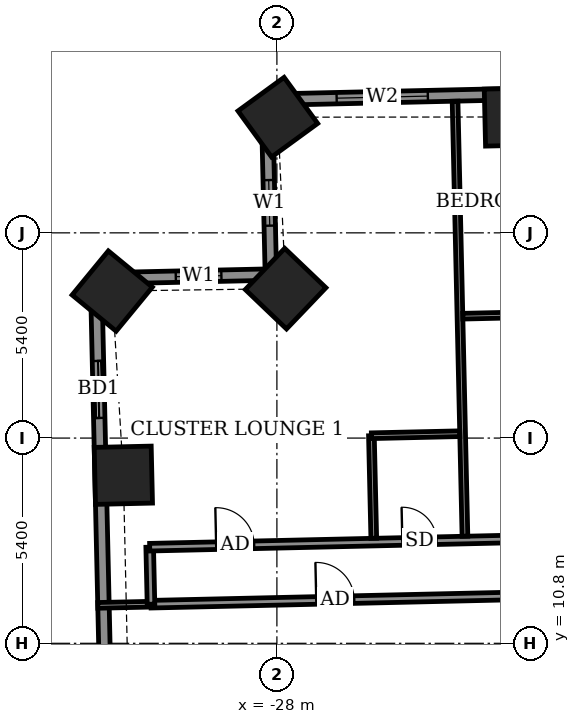
"""IFC4 building model, lengths in metres.
Left out: names, types, materials, properties, quantities, classifications, styles, units other than length and angle.
Written with IfcOpenShell. Run it as: python <this file> out.ifc"""

import sys

from ifc_helpers import new_model, si_unit, direction, frame, frame_2d, origin, origin_2d, place, context, subcontext, project, spatial, rectangle, extrude, element, fill, save


model = new_model("IFC4")
c1 = context("Model", 3, precision=1e-05, world=origin(), true_north=direction((0.0, 1.0)))
c2 = subcontext(c1, "Body", "Model", "MODEL_VIEW")
j1 = project(units=[si_unit("LENGTHUNIT", "METRE"), si_unit("PLANEANGLEUNIT", "RADIAN")], contexts=[c1])
p1 = place(None, origin())
s1 = spatial("IfcSite", under=j1, at=p1, CompositionType="ELEMENT")
p2 = place(p1, origin())
s2 = spatial("IfcBuilding", under=s1, at=p2, CompositionType="ELEMENT")
p3 = place(p2, frame((0.0, 0.0, 48.5)))
s3 = spatial("IfcBuildingStorey", under=s2, at=p3, CompositionType="ELEMENT", Elevation=48.5)
for number, where, z_axis, x_axis in (
    (1, (-21.777, 24.649, -0.55), (0.0, 0.0, 1.0), (-1.0, -0.023, 0.0)),
    (2, (-27.975, 24.643, -0.55), (0.0, 0.0, 1.0), (-0.808, -0.589, 0.0)),
    (3, (-27.771, 20.132, -0.55), (0.0, 0.0, 1.0), (-0.691, -0.723, 0.0)),
    (4, (-32.333, 20.069, -0.55), (0.0, 0.0, 1.0), (-0.635, -0.772, 0.0)),
    (5, (-32.04, 15.222, -0.55), (0.0, 0.0, 1.0), (0.023, -1.0, 0.0)),
):
    element("IfcColumn", number, at=place(p3, frame(where, z_axis=z_axis, x_axis=x_axis)), inside=s3, PredefinedType="COLUMN", context=c2, shape_type="SweptSolid", body=[
        extrude(rectangle(XDim=1.5, YDim=1.5, at=origin_2d()), origin(), (0.0, 0.0, 1.0), 3.6),
    ])
p4 = place(p3, frame((24.423, 26.298, 0.0), z_axis=(0.0, 0.0, 1.0), x_axis=(-0.999742433108, -0.022695097355, 0.0)))
e6 = element("IfcWall", 6, at=p4, inside=s3, PredefinedType="SOLIDWALL", context=c2, shape_type="SweptSolid", body=[
    extrude(rectangle(XDim=52.701, YDim=0.3, at=frame_2d((26.35, 0.0))), origin(), (0.0, 0.0, 1.0), 3.05),
])
p5 = place(p4, frame((2.009, 0.0, 0.0)))
e7 = element("IfcOpeningElement", 7, at=p5, cuts=e6, PredefinedType="OPENING", context=c2, shape_type="SweptSolid", body=[
    extrude(rectangle(XDim=1.5, YDim=2.4, at=frame_2d((0.75, 1.2))), frame((0.0, 0.16, 0.0), z_axis=(0.0, -1.0, 0.0), x_axis=(1.0, 0.0, 0.0)), (0.0, 0.0, 1.0), 0.32),
])
p6 = place(p4, frame((7.337, 0.0, 0.0)))
e8 = element("IfcOpeningElement", 8, at=p6, cuts=e6, PredefinedType="OPENING", context=c2, shape_type="SweptSolid", body=[
    extrude(rectangle(XDim=1.2, YDim=2.4, at=frame_2d((0.6, 1.2))), frame((0.0, 0.16, 0.0), z_axis=(0.0, -1.0, 0.0), x_axis=(1.0, 0.0, 0.0)), (0.0, 0.0, 1.0), 0.32),
])
p7 = place(p4, frame((10.0, 0.0, 0.0)))
e9 = element("IfcOpeningElement", 9, at=p7, cuts=e6, PredefinedType="OPENING", context=c2, shape_type="SweptSolid", body=[
    extrude(rectangle(XDim=1.5, YDim=2.4, at=frame_2d((0.75, 1.2))), frame((0.0, 0.16, 0.0), z_axis=(0.0, -1.0, 0.0), x_axis=(1.0, 0.0, 0.0)), (0.0, 0.0, 1.0), 0.32),
])
p8 = place(p4, frame((14.85, 0.0, 0.0)))
e10 = element("IfcOpeningElement", 10, at=p8, cuts=e6, PredefinedType="OPENING", context=c2, shape_type="SweptSolid", body=[
    extrude(rectangle(XDim=1.5, YDim=2.4, at=frame_2d((0.75, 1.2))), frame((0.0, 0.16, 0.0), z_axis=(0.0, -1.0, 0.0), x_axis=(1.0, 0.0, 0.0)), (0.0, 0.0, 1.0), 0.32),
])
p9 = place(p4, frame((20.638, 0.0, 0.9)))
e11 = element("IfcOpeningElement", 11, at=p9, cuts=e6, PredefinedType="OPENING", context=c2, shape_type="SweptSolid", body=[
    extrude(rectangle(XDim=0.9, YDim=1.5, at=frame_2d((0.45, 0.75))), frame((0.0, 0.16, 0.0), z_axis=(0.0, -1.0, 0.0), x_axis=(1.0, 0.0, 0.0)), (0.0, 0.0, 1.0), 0.32),
])
p10 = place(p4, frame((23.125, 0.0, 0.0)))
e12 = element("IfcOpeningElement", 12, at=p10, cuts=e6, PredefinedType="OPENING", context=c2, shape_type="SweptSolid", body=[
    extrude(rectangle(XDim=1.5, YDim=2.4, at=frame_2d((0.75, 1.2))), frame((0.0, 0.16, 0.0), z_axis=(0.0, -1.0, 0.0), x_axis=(1.0, 0.0, 0.0)), (0.0, 0.0, 1.0), 0.32),
])
p11 = place(p4, frame((27.9, 0.0, 0.0)))
e13 = element("IfcOpeningElement", 13, at=p11, cuts=e6, PredefinedType="OPENING", context=c2, shape_type="SweptSolid", body=[
    extrude(rectangle(XDim=1.5, YDim=2.4, at=frame_2d((0.75, 1.2))), frame((0.0, 0.16, 0.0), z_axis=(0.0, -1.0, 0.0), x_axis=(1.0, 0.0, 0.0)), (0.0, 0.0, 1.0), 0.32),
])
p12 = place(p4, frame((30.862, 0.0, 0.0)))
e14 = element("IfcOpeningElement", 14, at=p12, cuts=e6, PredefinedType="OPENING", context=c2, shape_type="SweptSolid", body=[
    extrude(rectangle(XDim=1.2, YDim=2.4, at=frame_2d((0.6, 1.2))), frame((0.0, 0.16, 0.0), z_axis=(0.0, -1.0, 0.0), x_axis=(1.0, 0.0, 0.0)), (0.0, 0.0, 1.0), 0.32),
])
p13 = place(p4, frame((36.1, 0.0, 0.0)))
e15 = element("IfcOpeningElement", 15, at=p13, cuts=e6, PredefinedType="OPENING", context=c2, shape_type="SweptSolid", body=[
    extrude(rectangle(XDim=1.5, YDim=2.4, at=frame_2d((0.75, 1.2))), frame((0.0, 0.16, 0.0), z_axis=(0.0, -1.0, 0.0), x_axis=(1.0, 0.0, 0.0)), (0.0, 0.0, 1.0), 0.32),
])
p14 = place(p4, frame((40.975, 0.0, 0.0)))
e16 = element("IfcOpeningElement", 16, at=p14, cuts=e6, PredefinedType="OPENING", context=c2, shape_type="SweptSolid", body=[
    extrude(rectangle(XDim=1.5, YDim=2.4, at=frame_2d((0.75, 1.2))), frame((0.0, 0.16, 0.0), z_axis=(0.0, -1.0, 0.0), x_axis=(1.0, 0.0, 0.0)), (0.0, 0.0, 1.0), 0.32),
])
p15 = place(p4, frame((43.788, 0.0, 0.0)))
e17 = element("IfcOpeningElement", 17, at=p15, cuts=e6, PredefinedType="OPENING", context=c2, shape_type="SweptSolid", body=[
    extrude(rectangle(XDim=1.5, YDim=2.4, at=frame_2d((0.75, 1.2))), frame((0.0, 0.16, 0.0), z_axis=(0.0, -1.0, 0.0), x_axis=(1.0, 0.0, 0.0)), (0.0, 0.0, 1.0), 0.32),
])
p16 = place(p4, frame((48.464, 0.0, 0.9)))
e18 = element("IfcOpeningElement", 18, at=p16, cuts=e6, PredefinedType="OPENING", context=c2, shape_type="SweptSolid", body=[
    extrude(rectangle(XDim=2.4, YDim=1.5, at=frame_2d((1.2, 0.75))), frame((0.0, 0.16, 0.0), z_axis=(0.0, -1.0, 0.0), x_axis=(1.0, 0.0, 0.0)), (0.0, 0.0, 1.0), 0.32),
])
p17 = place(p3, frame((-28.264, 25.102, 0.0), z_axis=(0.0, 0.0, 1.0), x_axis=(0.022820258049, -0.999739584003, 0.0)))
e19 = element("IfcWall", 19, at=p17, inside=s3, PredefinedType="SOLIDWALL", context=c2, shape_type="SweptSolid", body=[
    extrude(rectangle(XDim=4.6, YDim=0.3, at=frame_2d((2.3, 0.0))), origin(), (0.0, 0.0, 1.0), 2.55),
])
p18 = place(p17, frame((2.114, 0.0, 0.9)))
e20 = element("IfcOpeningElement", 20, at=p18, cuts=e19, PredefinedType="OPENING", context=c2, shape_type="SweptSolid", body=[
    extrude(rectangle(XDim=1.2, YDim=1.5, at=frame_2d((0.6, 0.75))), frame((0.0, 0.16, 0.0), z_axis=(0.0, -1.0, 0.0), x_axis=(1.0, 0.0, 0.0)), (0.0, 0.0, 1.0), 0.32),
])
p19 = place(p3, frame((-28.159, 20.503, 0.0), z_axis=(0.0, 0.0, 1.0), x_axis=(-0.999744404568, -0.02260808559, 0.0)))
e21 = element("IfcWall", 21, at=p19, inside=s3, PredefinedType="SOLIDWALL", context=c2, shape_type="SweptSolid", body=[
    extrude(rectangle(XDim=4.6, YDim=0.3, at=frame_2d((2.3, 0.0))), origin(), (0.0, 0.0, 1.0), 3.05),
])
p20 = place(p19, frame((1.302, 0.0, 0.9)))
e22 = element("IfcOpeningElement", 22, at=p20, cuts=e21, PredefinedType="OPENING", context=c2, shape_type="SweptSolid", body=[
    extrude(rectangle(XDim=1.2, YDim=1.5, at=frame_2d((0.6, 0.75))), frame((0.0, 0.16, 0.0), z_axis=(0.0, -1.0, 0.0), x_axis=(1.0, 0.0, 0.0)), (0.0, 0.0, 1.0), 0.32),
])
p21 = place(p3, frame((-32.758, 20.399, 0.0), z_axis=(0.0, 0.0, 1.0), x_axis=(0.022668485183, -0.999743036875, 0.0)))
e23 = element("IfcWall", 23, at=p21, inside=s3, PredefinedType="SOLIDWALL", context=c2, shape_type="SweptSolid", body=[
    extrude(rectangle(XDim=15.929, YDim=0.3, at=frame_2d((7.964, 0.0))), origin(), (0.0, 0.0, 1.0), 3.05),
])
p22 = place(p21, frame((2.17, 0.0, 0.0)))
e24 = element("IfcOpeningElement", 24, at=p22, cuts=e23, PredefinedType="OPENING", context=c2, shape_type="SweptSolid", body=[
    extrude(rectangle(XDim=1.5, YDim=2.4, at=frame_2d((0.75, 1.2))), frame((0.0, 0.16, 0.0), z_axis=(0.0, -1.0, 0.0), x_axis=(1.0, 0.0, 0.0)), (0.0, 0.0, 1.0), 0.32),
])
p23 = place(p21, frame((12.275, 0.0, 0.9)))
e25 = element("IfcOpeningElement", 25, at=p23, cuts=e23, PredefinedType="OPENING", context=c2, shape_type="SweptSolid", body=[
    extrude(rectangle(XDim=2.4, YDim=1.5, at=frame_2d((1.2, 0.75))), frame((0.0, 0.16, 0.0), z_axis=(0.0, -1.0, 0.0), x_axis=(1.0, 0.0, 0.0)), (0.0, 0.0, 1.0), 0.32),
])
p24 = place(p3, frame((-28.446, 26.548, 0.0), z_axis=(0.0, 0.0, 1.0), x_axis=(0.999743608889, 0.022643243723, 0.0)))
e26 = element("IfcWall", 26, at=p24, inside=s3, PredefinedType="USERDEFINED", context=c2, shape_type="SweptSolid", body=[
    extrude(rectangle(XDim=2.199, YDim=0.55, at=frame_2d((1.1, 0.0))), origin(), (0.0, 0.0, 1.0), 0.8),
])
p25 = place(p3, frame((-34.032, 12.618, 0.0), z_axis=(0.0, 0.0, 1.0), x_axis=(-0.022662255828, 0.999743178102, 0.0)))
e27 = element("IfcWall", 27, at=p25, inside=s3, PredefinedType="USERDEFINED", context=c2, shape_type="SweptSolid", body=[
    extrude(rectangle(XDim=6.0, YDim=0.55, at=frame_2d((3.0, 0.0))), origin(), (0.0, 0.0, 1.0), 0.8),
])
p26 = place(p3, frame((-32.713, 11.798, 0.0), z_axis=(0.0, 0.0, 1.0), x_axis=(0.999756172383, 0.022081571112, 0.0)))
e28 = element("IfcWall", 28, at=p26, inside=s3, PredefinedType="PARTITIONING", context=c2, shape_type="SweptSolid", body=[
    extrude(rectangle(XDim=1.404, YDim=0.15, at=frame_2d((0.702, 0.0))), origin(), (0.0, 0.0, 1.0), 2.55),
])
p27 = place(p3, frame((-31.313, 11.829, 0.0), z_axis=(0.0, 0.0, 1.0), x_axis=(0.999742346277, 0.022698921993, 0.0)))
e29 = element("IfcWall", 29, at=p27, inside=s3, PredefinedType="PARTITIONING", context=c2, shape_type="SweptSolid", body=[
    extrude(rectangle(XDim=11.1, YDim=0.2, at=frame_2d((5.55, 0.0))), origin(), (0.0, 0.0, 1.0), 3.05),
])
p28 = place(p27, frame((4.35, 0.0, 0.0)))
e30 = element("IfcOpeningElement", 30, at=p28, cuts=e29, PredefinedType="OPENING", context=c2, shape_type="SweptSolid", body=[
    extrude(rectangle(XDim=1.0, YDim=2.1, at=frame_2d((0.5, 1.05))), frame((0.0, 0.11, 0.0), z_axis=(0.0, -1.0, 0.0), x_axis=(1.0, 0.0, 0.0)), (0.0, 0.0, 1.0), 0.22),
])
p29 = place(p3, frame((-31.313, 11.829, 0.0), z_axis=(0.0, 0.0, 1.0), x_axis=(-0.022617910375, 0.999744182344, 0.0)))
e31 = element("IfcWall", 31, at=p29, inside=s3, PredefinedType="PARTITIONING", context=c2, shape_type="SweptSolid", body=[
    extrude(rectangle(XDim=1.5, YDim=0.2, at=frame_2d((0.75, 0.0))), origin(), (0.0, 0.0, 1.0), 3.05),
])
p30 = place(p3, frame((-31.347, 13.329, 0.0), z_axis=(0.0, 0.0, 1.0), x_axis=(0.999742613079, 0.022687168058, 0.0)))
e32 = element("IfcWall", 32, at=p30, inside=s3, PredefinedType="PARTITIONING", context=c2, shape_type="SweptSolid", body=[
    extrude(rectangle(XDim=58.799, YDim=0.2, at=frame_2d((29.399, 0.0))), origin(), (0.0, 0.0, 1.0), 3.05),
])
p31 = place(p30, frame((56.675, 0.0, 0.0)))
e33 = element("IfcOpeningElement", 33, at=p31, cuts=e32, PredefinedType="OPENING", context=c2, shape_type="SweptSolid", body=[
    extrude(rectangle(XDim=1.0, YDim=2.1, at=frame_2d((0.5, 1.05))), frame((0.0, 0.11, 0.0), z_axis=(0.0, -1.0, 0.0), x_axis=(1.0, 0.0, 0.0)), (0.0, 0.0, 1.0), 0.22),
])
p32 = place(p30, frame((52.4, 0.0, 0.0)))
e34 = element("IfcOpeningElement", 34, at=p32, cuts=e32, PredefinedType="OPENING", context=c2, shape_type="SweptSolid", body=[
    extrude(rectangle(XDim=0.9, YDim=2.1, at=frame_2d((0.45, 1.05))), frame((0.0, 0.11, 0.0), z_axis=(0.0, -1.0, 0.0), x_axis=(1.0, 0.0, 0.0)), (0.0, 0.0, 1.0), 0.22),
])
p33 = place(p30, frame((47.7, 0.0, 0.0)))
e35 = element("IfcOpeningElement", 35, at=p33, cuts=e32, PredefinedType="OPENING", context=c2, shape_type="SweptSolid", body=[
    extrude(rectangle(XDim=0.9, YDim=2.1, at=frame_2d((0.45, 1.05))), frame((0.0, 0.11, 0.0), z_axis=(0.0, -1.0, 0.0), x_axis=(1.0, 0.0, 0.0)), (0.0, 0.0, 1.0), 0.22),
])
p34 = place(p30, frame((45.7, 0.0, 0.0)))
e36 = element("IfcOpeningElement", 36, at=p34, cuts=e32, PredefinedType="OPENING", context=c2, shape_type="SweptSolid", body=[
    extrude(rectangle(XDim=0.9, YDim=2.1, at=frame_2d((0.45, 1.05))), frame((0.0, 0.11, 0.0), z_axis=(0.0, -1.0, 0.0), x_axis=(1.0, 0.0, 0.0)), (0.0, 0.0, 1.0), 0.22),
])
p35 = place(p30, frame((38.95, 0.0, 0.0)))
e37 = element("IfcOpeningElement", 37, at=p35, cuts=e32, PredefinedType="OPENING", context=c2, shape_type="SweptSolid", body=[
    extrude(rectangle(XDim=0.9, YDim=2.1, at=frame_2d((0.45, 1.05))), frame((0.0, 0.11, 0.0), z_axis=(0.0, -1.0, 0.0), x_axis=(1.0, 0.0, 0.0)), (0.0, 0.0, 1.0), 0.22),
])
p36 = place(p30, frame((37.05, 0.0, 0.0)))
e38 = element("IfcOpeningElement", 38, at=p36, cuts=e32, PredefinedType="OPENING", context=c2, shape_type="SweptSolid", body=[
    extrude(rectangle(XDim=0.9, YDim=2.1, at=frame_2d((0.45, 1.05))), frame((0.0, 0.11, 0.0), z_axis=(0.0, -1.0, 0.0), x_axis=(1.0, 0.0, 0.0)), (0.0, 0.0, 1.0), 0.22),
])
p37 = place(p30, frame((30.375, 0.0, 0.0)))
e39 = element("IfcOpeningElement", 39, at=p37, cuts=e32, PredefinedType="OPENING", context=c2, shape_type="SweptSolid", body=[
    extrude(rectangle(XDim=0.9, YDim=2.1, at=frame_2d((0.45, 1.05))), frame((0.0, 0.11, 0.0), z_axis=(0.0, -1.0, 0.0), x_axis=(1.0, 0.0, 0.0)), (0.0, 0.0, 1.0), 0.22),
])
p38 = place(p30, frame((28.5, 0.0, 0.0)))
e40 = element("IfcOpeningElement", 40, at=p38, cuts=e32, PredefinedType="OPENING", context=c2, shape_type="SweptSolid", body=[
    extrude(rectangle(XDim=0.9, YDim=2.1, at=frame_2d((0.45, 1.05))), frame((0.0, 0.11, 0.0), z_axis=(0.0, -1.0, 0.0), x_axis=(1.0, 0.0, 0.0)), (0.0, 0.0, 1.0), 0.22),
])
p39 = place(p30, frame((21.825, 0.0, 0.0)))
e41 = element("IfcOpeningElement", 41, at=p39, cuts=e32, PredefinedType="OPENING", context=c2, shape_type="SweptSolid", body=[
    extrude(rectangle(XDim=0.9, YDim=2.1, at=frame_2d((0.45, 1.05))), frame((0.0, 0.11, 0.0), z_axis=(0.0, -1.0, 0.0), x_axis=(1.0, 0.0, 0.0)), (0.0, 0.0, 1.0), 0.22),
])
p40 = place(p30, frame((19.95, 0.0, 0.0)))
e42 = element("IfcOpeningElement", 42, at=p40, cuts=e32, PredefinedType="OPENING", context=c2, shape_type="SweptSolid", body=[
    extrude(rectangle(XDim=0.9, YDim=2.1, at=frame_2d((0.45, 1.05))), frame((0.0, 0.11, 0.0), z_axis=(0.0, -1.0, 0.0), x_axis=(1.0, 0.0, 0.0)), (0.0, 0.0, 1.0), 0.22),
])
p41 = place(p30, frame((13.225, 0.0, 0.0)))
e43 = element("IfcOpeningElement", 43, at=p41, cuts=e32, PredefinedType="OPENING", context=c2, shape_type="SweptSolid", body=[
    extrude(rectangle(XDim=0.9, YDim=2.1, at=frame_2d((0.45, 1.05))), frame((0.0, 0.11, 0.0), z_axis=(0.0, -1.0, 0.0), x_axis=(1.0, 0.0, 0.0)), (0.0, 0.0, 1.0), 0.22),
])
p42 = place(p30, frame((11.25, 0.0, 0.0)))
e44 = element("IfcOpeningElement", 44, at=p42, cuts=e32, PredefinedType="OPENING", context=c2, shape_type="SweptSolid", body=[
    extrude(rectangle(XDim=0.9, YDim=2.1, at=frame_2d((0.45, 1.05))), frame((0.0, 0.11, 0.0), z_axis=(0.0, -1.0, 0.0), x_axis=(1.0, 0.0, 0.0)), (0.0, 0.0, 1.0), 0.22),
])
p43 = place(p30, frame((1.75, 0.0, 0.0)))
e45 = element("IfcOpeningElement", 45, at=p43, cuts=e32, PredefinedType="OPENING", context=c2, shape_type="SweptSolid", body=[
    extrude(rectangle(XDim=1.0, YDim=2.1, at=frame_2d((0.5, 1.05))), frame((0.0, 0.11, 0.0), z_axis=(0.0, -1.0, 0.0), x_axis=(1.0, 0.0, 0.0)), (0.0, 0.0, 1.0), 0.22),
])
p44 = place(p30, frame((6.65, 0.0, 0.0)))
e46 = element("IfcOpeningElement", 46, at=p44, cuts=e32, PredefinedType="OPENING", context=c2, shape_type="SweptSolid", body=[
    extrude(rectangle(XDim=0.9, YDim=2.1, at=frame_2d((0.45, 1.05))), frame((0.0, 0.11, 0.0), z_axis=(0.0, -1.0, 0.0), x_axis=(1.0, 0.0, 0.0)), (0.0, 0.0, 1.0), 0.22),
])
p45 = place(p3, frame((-25.451, 13.563, 0.0), z_axis=(0.0, 0.0, 1.0), x_axis=(-0.022969966847, 0.999736155505, 0.0)))
e47 = element("IfcWall", 47, at=p45, inside=s3, PredefinedType="PARTITIONING", context=c2, shape_type="SweptSolid", body=[
    extrude(rectangle(XDim=2.7, YDim=0.15, at=frame_2d((1.35, 0.0))), origin(), (0.0, 0.0, 1.0), 3.05),
])
p46 = place(p3, frame((-23.052, 13.617, 0.0), z_axis=(0.0, 0.0, 1.0), x_axis=(-0.022708327922, 0.999742132674, 0.0)))
e48 = element("IfcWall", 48, at=p46, inside=s3, PredefinedType="PARTITIONING", context=c2, shape_type="SweptSolid", body=[
    extrude(rectangle(XDim=11.45, YDim=0.15, at=frame_2d((5.725, 0.0))), origin(), (0.0, 0.0, 1.0), 2.55),
])
p47 = place(p3, frame((-25.513, 16.262, 0.0), z_axis=(0.0, 0.0, 1.0), x_axis=(0.999740478815, 0.022781023197, 0.0)))
e49 = element("IfcWall", 49, at=p47, inside=s3, PredefinedType="PARTITIONING", context=c2, shape_type="SweptSolid", body=[
    extrude(rectangle(XDim=2.325, YDim=0.15, at=frame_2d((1.163, 0.0))), origin(), (0.0, 0.0, 1.0), 3.05),
])
p48 = place(p3, frame((-23.108, 19.407, 0.0), z_axis=(0.0, 0.0, 1.0), x_axis=(0.999740260747, 0.02279059109, 0.0)))
e50 = element("IfcWall", 50, at=p48, inside=s3, PredefinedType="PARTITIONING", context=c2, shape_type="SweptSolid", body=[
    extrude(rectangle(XDim=2.324, YDim=0.15, at=frame_2d((1.162, 0.0))), origin(), (0.0, 0.0, 1.0), 3.05),
])
p49 = place(p16, origin())
e51 = element("IfcWindow", 51, at=p49, inside=s3, PartitioningType="DOUBLE_PANEL_VERTICAL", PredefinedType="WINDOW", context=c2, shape_type="SweptSolid", body=[
    extrude(rectangle(XDim=2.4, YDim=1.5, at=frame_2d((1.2, 0.75))), frame((0.0, 0.03, 0.0), z_axis=(0.0, -1.0, 0.0), x_axis=(1.0, 0.0, 0.0)), (0.0, 0.0, 1.0), 0.06),
])
fill(e18, e51)
p50 = place(p18, origin())
e52 = element("IfcWindow", 52, at=p50, inside=s3, PartitioningType="SINGLE_PANEL", PredefinedType="WINDOW", context=c2, shape_type="SweptSolid", body=[
    extrude(rectangle(XDim=1.2, YDim=1.5, at=frame_2d((0.6, 0.75))), frame((0.0, 0.03, 0.0), z_axis=(0.0, -1.0, 0.0), x_axis=(1.0, 0.0, 0.0)), (0.0, 0.0, 1.0), 0.06),
])
fill(e20, e52)
p51 = place(p20, origin())
e53 = element("IfcWindow", 53, at=p51, inside=s3, PartitioningType="SINGLE_PANEL", PredefinedType="WINDOW", context=c2, shape_type="SweptSolid", body=[
    extrude(rectangle(XDim=1.2, YDim=1.5, at=frame_2d((0.6, 0.75))), frame((0.0, 0.03, 0.0), z_axis=(0.0, -1.0, 0.0), x_axis=(1.0, 0.0, 0.0)), (0.0, 0.0, 1.0), 0.06),
])
fill(e22, e53)
p52 = place(p22, origin())
e54 = element("IfcDoor", 54, at=p52, inside=s3, OperationType="SLIDING_TO_LEFT", PredefinedType="DOOR", context=c2, shape_type="SweptSolid", body=[
    extrude(rectangle(XDim=1.5, YDim=2.4, at=frame_2d((0.75, 1.2))), frame((0.0, 0.025, 0.0), z_axis=(0.0, -1.0, 0.0), x_axis=(1.0, 0.0, 0.0)), (0.0, 0.0, 1.0), 0.05),
])
fill(e24, e54)
p53 = place(p43, origin())
e55 = element("IfcDoor", 55, at=p53, inside=s3, OperationType="SINGLE_SWING_LEFT", PredefinedType="DOOR", context=c2, shape_type="SweptSolid", body=[
    extrude(rectangle(XDim=1.0, YDim=2.1, at=frame_2d((0.5, 1.05))), frame((0.0, 0.025, 0.0), z_axis=(0.0, -1.0, 0.0), x_axis=(1.0, 0.0, 0.0)), (0.0, 0.0, 1.0), 0.05),
])
fill(e45, e55)
p54 = place(p44, origin())
e56 = element("IfcDoor", 56, at=p54, inside=s3, OperationType="SINGLE_SWING_LEFT", PredefinedType="DOOR", context=c2, shape_type="SweptSolid", body=[
    extrude(rectangle(XDim=0.9, YDim=2.1, at=frame_2d((0.45, 1.05))), frame((0.0, 0.025, 0.0), z_axis=(0.0, -1.0, 0.0), x_axis=(1.0, 0.0, 0.0)), (0.0, 0.0, 1.0), 0.05),
])
fill(e46, e56)
p55 = place(p28, origin())
e57 = element("IfcDoor", 57, at=p55, inside=s3, OperationType="SINGLE_SWING_RIGHT", PredefinedType="DOOR", context=c2, shape_type="SweptSolid", body=[
    extrude(rectangle(XDim=1.0, YDim=2.1, at=frame_2d((0.5, 1.05))), frame((0.0, 0.025, 0.0), z_axis=(0.0, -1.0, 0.0), x_axis=(1.0, 0.0, 0.0)), (0.0, 0.0, 1.0), 0.05),
])
fill(e30, e57)
save(model, sys.argv[1])
